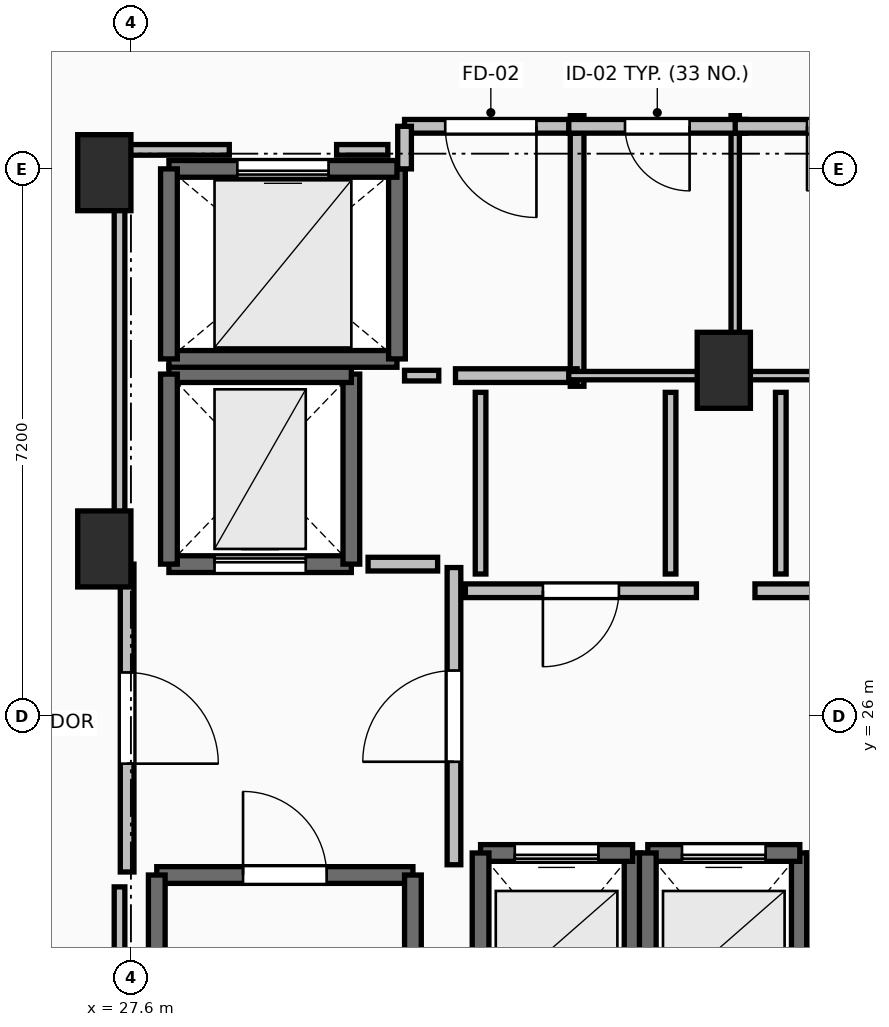
"""IFC4 building model, lengths in metres.
Left out: names, types, materials, properties, quantities, classifications, styles, units other than length and angle.
Written with IfcOpenShell. Run it as: python <this file> out.ifc"""

import sys

from ifc_helpers import new_model, si_unit, direction, frame, frame_2d, origin, origin_2d, place, context, subcontext, project, spatial, rectangle, extrude, element, fill, save


model = new_model("IFC4")
c1 = context("Model", 3, precision=1e-05, world=origin(), true_north=direction((0.0, 1.0)))
c2 = subcontext(c1, "Body", "Model", "MODEL_VIEW")
j1 = project(units=[si_unit("LENGTHUNIT", "METRE"), si_unit("PLANEANGLEUNIT", "RADIAN")], contexts=[c1])
p1 = place(None, origin())
s1 = spatial("IfcSite", under=j1, at=p1, CompositionType="ELEMENT")
p2 = place(p1, origin())
s2 = spatial("IfcBuilding", under=s1, at=p2, CompositionType="ELEMENT")
p3 = place(p2, frame((0.0, 0.0, 217.85)))
s3 = spatial("IfcBuildingStorey", under=s2, at=p3, CompositionType="ELEMENT", Elevation=217.85)
for number, where, z_axis, x_axis in (
    (1, (27.25, 28.2, 0.0), (0.0, 0.0, 1.0), (1.0, 0.0, 0.0)),
    (2, (27.25, 33.15, 0.0), (0.0, 0.0, 1.0), (1.0, 0.0, 0.0)),
    (3, (35.4, 30.55, 0.0), (0.0, 0.0, 1.0), (1.0, 0.0, 0.0)),
):
    element("IfcColumn", number, at=place(p3, frame(where, z_axis=z_axis, x_axis=x_axis)), inside=s3, PredefinedType="PILASTER", context=c2, shape_type="SweptSolid", body=[
        extrude(rectangle(XDim=0.7, YDim=1.0, at=origin_2d()), origin(), (0.0, 0.0, 1.0), 3.55),
    ])
p4 = place(p3, frame((27.94, 23.91, 0.0), z_axis=(0.0, 0.0, 1.0), x_axis=(1.0, 0.0, 0.0)))
e4 = element("IfcWall", 4, at=p4, inside=s3, PredefinedType="SOLIDWALL", context=c2, shape_type="SweptSolid", body=[
    extrude(rectangle(XDim=3.37, YDim=0.22, at=frame_2d((1.685, 0.0))), origin(), (0.0, 0.0, 1.0), 3.29),
])
p5 = place(p4, frame((1.135, 0.0, 0.0)))
e5 = element("IfcOpeningElement", 5, at=p5, cuts=e4, PredefinedType="OPENING", context=c2, shape_type="SweptSolid", body=[
    extrude(rectangle(XDim=1.1, YDim=2.15, at=frame_2d((0.55, 1.075))), frame((0.0, 0.125, 0.0), z_axis=(0.0, -1.0, 0.0), x_axis=(1.0, 0.0, 0.0)), (0.0, 0.0, 1.0), 0.25),
])
for number, where, z_axis, x_axis in (
    (6, (31.31, 23.91, 0.0), (0.0, 0.0, 1.0), (0.0, -1.0, 0.0)),
    (7, (27.94, 16.49, 0.0), (0.0, 0.0, 1.0), (0.0, 1.0, 0.0)),
):
    element("IfcWall", number, at=place(p3, frame(where, z_axis=z_axis, x_axis=x_axis)), inside=s3, PredefinedType="SOLIDWALL", context=c2, shape_type="SweptSolid", body=[
        extrude(rectangle(XDim=7.42, YDim=0.22, at=frame_2d((3.71, 0.0))), origin(), (0.0, 0.0, 1.0), 3.29),
    ])
p6 = place(p3, frame((34.2, 21.8, 0.0), z_axis=(0.0, 0.0, 1.0), x_axis=(0.0, 1.0, 0.0)))
e8 = element("IfcWall", 8, at=p6, inside=s3, PredefinedType="SOLIDWALL", context=c2, shape_type="SweptSolid", body=[
    extrude(rectangle(XDim=2.4, YDim=0.22, at=frame_2d((1.2, 0.0))), origin(), (0.0, 0.0, 1.0), 3.29),
])
p7 = place(p3, frame((34.2, 24.2, 0.0), z_axis=(0.0, 0.0, 1.0), x_axis=(-1.0, 0.0, 0.0)))
e9 = element("IfcWall", 9, at=p7, inside=s3, PredefinedType="SOLIDWALL", context=c2, shape_type="SweptSolid", body=[
    extrude(rectangle(XDim=2.0, YDim=0.22, at=frame_2d((1.0, 0.0))), origin(), (0.0, 0.0, 1.0), 3.29),
])
p8 = place(p7, frame((0.45, 0.0, 0.0)))
e10 = element("IfcOpeningElement", 10, at=p8, cuts=e9, PredefinedType="OPENING", context=c2, shape_type="SweptSolid", body=[
    extrude(rectangle(XDim=1.1, YDim=2.2, at=frame_2d((0.55, 1.1))), frame((0.0, 0.125, 0.0), z_axis=(0.0, -1.0, 0.0), x_axis=(1.0, 0.0, 0.0)), (0.0, 0.0, 1.0), 0.25),
])
for number, where, z_axis, x_axis in (
    (11, (32.2, 24.2, 0.0), (0.0, 0.0, 1.0), (0.0, -1.0, 0.0)),
    (12, (36.4, 21.8, 0.0), (0.0, 0.0, 1.0), (0.0, 1.0, 0.0)),
):
    element("IfcWall", number, at=place(p3, frame(where, z_axis=z_axis, x_axis=x_axis)), inside=s3, PredefinedType="SOLIDWALL", context=c2, shape_type="SweptSolid", body=[
        extrude(rectangle(XDim=2.4, YDim=0.22, at=frame_2d((1.2, 0.0))), origin(), (0.0, 0.0, 1.0), 3.29),
    ])
p9 = place(p3, frame((36.4, 24.2, 0.0), z_axis=(0.0, 0.0, 1.0), x_axis=(-1.0, 0.0, 0.0)))
e13 = element("IfcWall", 13, at=p9, inside=s3, PredefinedType="SOLIDWALL", context=c2, shape_type="SweptSolid", body=[
    extrude(rectangle(XDim=2.0, YDim=0.22, at=frame_2d((1.0, 0.0))), origin(), (0.0, 0.0, 1.0), 3.29),
])
p10 = place(p9, frame((0.45, 0.0, 0.0)))
e14 = element("IfcOpeningElement", 14, at=p10, cuts=e13, PredefinedType="OPENING", context=c2, shape_type="SweptSolid", body=[
    extrude(rectangle(XDim=1.1, YDim=2.2, at=frame_2d((0.55, 1.1))), frame((0.0, 0.125, 0.0), z_axis=(0.0, -1.0, 0.0), x_axis=(1.0, 0.0, 0.0)), (0.0, 0.0, 1.0), 0.25),
])
p11 = place(p3, frame((34.4, 24.2, 0.0), z_axis=(0.0, 0.0, 1.0), x_axis=(0.0, -1.0, 0.0)))
e15 = element("IfcWall", 15, at=p11, inside=s3, PredefinedType="SOLIDWALL", context=c2, shape_type="SweptSolid", body=[
    extrude(rectangle(XDim=2.4, YDim=0.22, at=frame_2d((1.2, 0.0))), origin(), (0.0, 0.0, 1.0), 3.29),
])
p12 = place(p3, frame((36.6, 24.2, 0.0), z_axis=(0.0, 0.0, 1.0), x_axis=(0.0, -1.0, 0.0)))
e16 = element("IfcWall", 16, at=p12, inside=s3, PredefinedType="SOLIDWALL", context=c2, shape_type="SweptSolid", body=[
    extrude(rectangle(XDim=2.6, YDim=0.22, at=frame_2d((1.3, 0.0))), origin(), (0.0, 0.0, 1.0), 3.29),
])
p13 = place(p3, frame((28.1, 28.0, 0.0), z_axis=(0.0, 0.0, 1.0), x_axis=(1.0, 0.0, 0.0)))
e17 = element("IfcWall", 17, at=p13, inside=s3, PredefinedType="SHEAR", context=c2, shape_type="SweptSolid", body=[
    extrude(rectangle(XDim=2.4, YDim=0.22, at=frame_2d((1.2, 0.0))), origin(), (0.0, 0.0, 1.0), 3.29),
])
p14 = place(p13, frame((0.6, 0.0, 0.0)))
e18 = element("IfcOpeningElement", 18, at=p14, cuts=e17, PredefinedType="OPENING", context=c2, shape_type="SweptSolid", body=[
    extrude(rectangle(XDim=1.2, YDim=2.2, at=frame_2d((0.6, 1.1))), frame((0.0, 0.125, 0.0), z_axis=(0.0, -1.0, 0.0), x_axis=(1.0, 0.0, 0.0)), (0.0, 0.0, 1.0), 0.25),
])
p15 = place(p3, frame((30.5, 28.0, 0.0), z_axis=(0.0, 0.0, 1.0), x_axis=(0.0, 1.0, 0.0)))
e19 = element("IfcWall", 19, at=p15, inside=s3, PredefinedType="SHEAR", context=c2, shape_type="SweptSolid", body=[
    extrude(rectangle(XDim=2.5, YDim=0.22, at=frame_2d((1.25, 0.0))), origin(), (0.0, 0.0, 1.0), 3.29),
])
p16 = place(p3, frame((30.5, 30.5, 0.0), z_axis=(0.0, 0.0, 1.0), x_axis=(-1.0, 0.0, 0.0)))
e20 = element("IfcWall", 20, at=p16, inside=s3, PredefinedType="SHEAR", context=c2, shape_type="SweptSolid", body=[
    extrude(rectangle(XDim=2.4, YDim=0.22, at=frame_2d((1.2, 0.0))), origin(), (0.0, 0.0, 1.0), 3.29),
])
p17 = place(p3, frame((28.1, 30.5, 0.0), z_axis=(0.0, 0.0, 1.0), x_axis=(0.0, -1.0, 0.0)))
e21 = element("IfcWall", 21, at=p17, inside=s3, PredefinedType="SHEAR", context=c2, shape_type="SweptSolid", body=[
    extrude(rectangle(XDim=2.5, YDim=0.22, at=frame_2d((1.25, 0.0))), origin(), (0.0, 0.0, 1.0), 3.29),
])
p18 = place(p3, frame((28.1, 30.7, 0.0), z_axis=(0.0, 0.0, 1.0), x_axis=(1.0, 0.0, 0.0)))
e22 = element("IfcWall", 22, at=p18, inside=s3, PredefinedType="SOLIDWALL", context=c2, shape_type="SweptSolid", body=[
    extrude(rectangle(XDim=3.0, YDim=0.22, at=frame_2d((1.5, 0.0))), origin(), (0.0, 0.0, 1.0), 3.29),
])
p19 = place(p3, frame((31.1, 30.7, 0.0), z_axis=(0.0, 0.0, 1.0), x_axis=(0.0, 1.0, 0.0)))
e23 = element("IfcWall", 23, at=p19, inside=s3, PredefinedType="SOLIDWALL", context=c2, shape_type="SweptSolid", body=[
    extrude(rectangle(XDim=2.5, YDim=0.22, at=frame_2d((1.25, 0.0))), origin(), (0.0, 0.0, 1.0), 3.29),
])
p20 = place(p3, frame((31.1, 33.2, 0.0), z_axis=(0.0, 0.0, 1.0), x_axis=(-1.0, 0.0, 0.0)))
e24 = element("IfcWall", 24, at=p20, inside=s3, PredefinedType="SOLIDWALL", context=c2, shape_type="SweptSolid", body=[
    extrude(rectangle(XDim=3.0, YDim=0.22, at=frame_2d((1.5, 0.0))), origin(), (0.0, 0.0, 1.0), 3.29),
])
p21 = place(p20, frame((0.9, 0.0, 0.0)))
e25 = element("IfcOpeningElement", 25, at=p21, cuts=e24, PredefinedType="OPENING", context=c2, shape_type="SweptSolid", body=[
    extrude(rectangle(XDim=1.2, YDim=2.2, at=frame_2d((0.6, 1.1))), frame((0.0, 0.125, 0.0), z_axis=(0.0, -1.0, 0.0), x_axis=(1.0, 0.0, 0.0)), (0.0, 0.0, 1.0), 0.25),
])
p22 = place(p3, frame((28.1, 33.2, 0.0), z_axis=(0.0, 0.0, 1.0), x_axis=(0.0, -1.0, 0.0)))
e26 = element("IfcWall", 26, at=p22, inside=s3, PredefinedType="SOLIDWALL", context=c2, shape_type="SweptSolid", body=[
    extrude(rectangle(XDim=2.5, YDim=0.22, at=frame_2d((1.25, 0.0))), origin(), (0.0, 0.0, 1.0), 3.29),
])
p23 = place(p3, frame((31.85, 24.045, 0.0), z_axis=(0.0, 0.0, 1.0), x_axis=(0.0, 1.0, 0.0)))
e27 = element("IfcWall", 27, at=p23, inside=s3, PredefinedType="PARTITIONING", context=c2, shape_type="SweptSolid", body=[
    extrude(rectangle(XDim=3.91, YDim=0.18, at=frame_2d((1.955, 0.0))), origin(), (0.0, 0.0, 1.0), 3.29),
])
p24 = place(p23, frame((1.355, 0.0, 0.0)))
e28 = element("IfcOpeningElement", 28, at=p24, cuts=e27, PredefinedType="OPENING", context=c2, shape_type="SweptSolid", body=[
    extrude(rectangle(XDim=1.2, YDim=2.15, at=frame_2d((0.6, 1.075))), frame((0.0, 0.105, 0.0), z_axis=(0.0, -1.0, 0.0), x_axis=(1.0, 0.0, 0.0)), (0.0, 0.0, 1.0), 0.21),
])
p25 = place(p3, frame((27.55, 28.0, 0.0), z_axis=(0.0, 0.0, 1.0), x_axis=(0.0, -1.0, 0.0)))
e29 = element("IfcWall", 29, at=p25, inside=s3, PredefinedType="PARTITIONING", context=c2, shape_type="SweptSolid", body=[
    extrude(rectangle(XDim=4.05, YDim=0.18, at=frame_2d((2.025, 0.0))), origin(), (0.0, 0.0, 1.0), 3.29),
])
p26 = place(p25, frame((1.425, 0.0, 0.0)))
e30 = element("IfcOpeningElement", 30, at=p26, cuts=e29, PredefinedType="OPENING", context=c2, shape_type="SweptSolid", body=[
    extrude(rectangle(XDim=1.2, YDim=2.15, at=frame_2d((0.6, 1.075))), frame((0.0, 0.105, 0.0), z_axis=(0.0, -1.0, 0.0), x_axis=(1.0, 0.0, 0.0)), (0.0, 0.0, 1.0), 0.21),
])
p27 = place(p3, frame((33.47, 30.34, 0.0), z_axis=(0.0, 0.0, 1.0), x_axis=(0.0, 1.0, 0.0)))
e31 = element("IfcWall", 31, at=p27, inside=s3, PredefinedType="PARTITIONING", context=c2, shape_type="SweptSolid", body=[
    extrude(rectangle(XDim=3.56, YDim=0.18, at=frame_2d((1.78, 0.0))), origin(), (0.0, 0.0, 1.0), 3.29),
])
p28 = place(p3, frame((31.87, 30.48, 0.0), z_axis=(0.0, 0.0, 1.0), x_axis=(1.0, 0.0, 0.0)))
e32 = element("IfcWall", 32, at=p28, inside=s3, PredefinedType="PARTITIONING", context=c2, shape_type="SweptSolid", body=[
    extrude(rectangle(XDim=1.6, YDim=0.18, at=frame_2d((0.8, 0.0))), origin(), (0.0, 0.0, 1.0), 3.29),
])
p29 = place(p3, frame((33.47, 33.76, 0.0), z_axis=(0.0, 0.0, 1.0), x_axis=(-1.0, 0.0, 0.0)))
e33 = element("IfcWall", 33, at=p29, inside=s3, PredefinedType="PARTITIONING", context=c2, shape_type="SweptSolid", body=[
    extrude(rectangle(XDim=2.27, YDim=0.18, at=frame_2d((1.135, 0.0))), origin(), (0.0, 0.0, 1.0), 3.29),
])
p30 = place(p29, frame((0.535, 0.0, 0.0)))
e34 = element("IfcOpeningElement", 34, at=p30, cuts=e33, PredefinedType="OPENING", context=c2, shape_type="SweptSolid", body=[
    extrude(rectangle(XDim=1.2, YDim=2.15, at=frame_2d((0.6, 1.075))), frame((0.0, 0.105, 0.0), z_axis=(0.0, -1.0, 0.0), x_axis=(1.0, 0.0, 0.0)), (0.0, 0.0, 1.0), 0.21),
])
p31 = place(p3, frame((31.2, 33.76, 0.0), z_axis=(0.0, 0.0, 1.0), x_axis=(0.0, -1.0, 0.0)))
e35 = element("IfcWall", 35, at=p31, inside=s3, PredefinedType="PARTITIONING", context=c2, shape_type="SweptSolid", body=[
    extrude(rectangle(XDim=0.56, YDim=0.18, at=frame_2d((0.28, 0.0))), origin(), (0.0, 0.0, 1.0), 3.29),
])
p32 = place(p3, frame((35.04, 27.65, 0.0), z_axis=(0.0, 0.0, 1.0), x_axis=(-1.0, 0.0, 0.0)))
e36 = element("IfcWall", 36, at=p32, inside=s3, PredefinedType="PARTITIONING", context=c2, shape_type="SweptSolid", body=[
    extrude(rectangle(XDim=3.04, YDim=0.18, at=frame_2d((1.52, 0.0))), origin(), (0.0, 0.0, 1.0), 3.29),
])
p33 = place(p32, frame((1.02, 0.0, 0.0)))
e37 = element("IfcOpeningElement", 37, at=p33, cuts=e36, PredefinedType="OPENING", context=c2, shape_type="SweptSolid", body=[
    extrude(rectangle(XDim=1.0, YDim=2.15, at=frame_2d((0.5, 1.075))), frame((0.0, 0.105, 0.0), z_axis=(0.0, -1.0, 0.0), x_axis=(1.0, 0.0, 0.0)), (0.0, 0.0, 1.0), 0.21),
])
p34 = place(p3, frame((39.19, 27.65, 0.0), z_axis=(0.0, 0.0, 1.0), x_axis=(-1.0, 0.0, 0.0)))
e38 = element("IfcWall", 38, at=p34, inside=s3, PredefinedType="PARTITIONING", context=c2, shape_type="SweptSolid", body=[
    extrude(rectangle(XDim=3.38, YDim=0.18, at=frame_2d((1.69, 0.0))), origin(), (0.0, 0.0, 1.0), 3.29),
])
p35 = place(p34, frame((1.265, 0.0, 0.0)))
e39 = element("IfcOpeningElement", 39, at=p35, cuts=e38, PredefinedType="OPENING", context=c2, shape_type="SweptSolid", body=[
    extrude(rectangle(XDim=0.85, YDim=2.1, at=frame_2d((0.425, 1.05))), frame((0.0, 0.105, 0.0), z_axis=(0.0, -1.0, 0.0), x_axis=(1.0, 0.0, 0.0)), (0.0, 0.0, 1.0), 0.21),
])
p36 = place(p3, frame((35.55, 30.34, 0.0), z_axis=(0.0, 0.0, 1.0), x_axis=(0.0, 1.0, 0.0)))
e40 = element("IfcWall", 40, at=p36, inside=s3, PredefinedType="PARTITIONING", context=c2, shape_type="SweptSolid", body=[
    extrude(rectangle(XDim=3.56, YDim=0.11, at=frame_2d((1.78, 0.0))), origin(), (0.0, 0.0, 1.0), 2.482),
])
p37 = place(p3, frame((33.36, 30.48, 0.0), z_axis=(0.0, 0.0, 1.0), x_axis=(1.0, 0.0, 0.0)))
e41 = element("IfcWall", 41, at=p37, inside=s3, PredefinedType="PARTITIONING", context=c2, shape_type="SweptSolid", body=[
    extrude(rectangle(XDim=1.81, YDim=0.11, at=frame_2d((0.905, 0.0))), origin(), (0.0, 0.0, 1.0), 3.29),
])
p38 = place(p3, frame((35.69, 33.76, 0.0), z_axis=(0.0, 0.0, 1.0), x_axis=(-1.0, 0.0, 0.0)))
e42 = element("IfcWall", 42, at=p38, inside=s3, PredefinedType="PARTITIONING", context=c2, shape_type="SweptSolid", body=[
    extrude(rectangle(XDim=2.33, YDim=0.18, at=frame_2d((1.165, 0.0))), origin(), (0.0, 0.0, 1.0), 3.29),
])
p39 = place(p38, frame((0.74, 0.0, 0.0)))
e43 = element("IfcOpeningElement", 43, at=p39, cuts=e42, PredefinedType="OPENING", context=c2, shape_type="SweptSolid", body=[
    extrude(rectangle(XDim=0.85, YDim=2.1, at=frame_2d((0.425, 1.05))), frame((0.0, 0.105, 0.0), z_axis=(0.0, -1.0, 0.0), x_axis=(1.0, 0.0, 0.0)), (0.0, 0.0, 1.0), 0.21),
])
p40 = place(p3, frame((35.68, 30.48, 0.0), z_axis=(0.0, 0.0, 1.0), x_axis=(1.0, 0.0, 0.0)))
e44 = element("IfcWall", 44, at=p40, inside=s3, PredefinedType="PARTITIONING", context=c2, shape_type="SweptSolid", body=[
    extrude(rectangle(XDim=2.595, YDim=0.11, at=frame_2d((1.297, 0.0))), origin(), (0.0, 0.0, 1.0), 2.482),
])
p41 = place(p3, frame((38.29, 33.76, 0.0), z_axis=(0.0, 0.0, 1.0), x_axis=(-1.0, 0.0, 0.0)))
e45 = element("IfcWall", 45, at=p41, inside=s3, PredefinedType="PARTITIONING", context=c2, shape_type="SweptSolid", body=[
    extrude(rectangle(XDim=2.74, YDim=0.18, at=frame_2d((1.37, 0.0))), origin(), (0.0, 0.0, 1.0), 3.29),
])
p42 = place(p41, frame((0.945, 0.0, 0.0)))
e46 = element("IfcOpeningElement", 46, at=p42, cuts=e45, PredefinedType="OPENING", context=c2, shape_type="SweptSolid", body=[
    extrude(rectangle(XDim=0.85, YDim=2.1, at=frame_2d((0.425, 1.05))), frame((0.0, 0.105, 0.0), z_axis=(0.0, -1.0, 0.0), x_axis=(1.0, 0.0, 0.0)), (0.0, 0.0, 1.0), 0.21),
])
p43 = place(p3, frame((31.635, 28.0, 0.0), z_axis=(0.0, 0.0, 1.0), x_axis=(-1.0, 0.0, 0.0)))
e47 = element("IfcWall", 47, at=p43, inside=s3, PredefinedType="PARTITIONING", context=c2, shape_type="SweptSolid", body=[
    extrude(rectangle(XDim=0.915, YDim=0.18, at=frame_2d((0.458, 0.0))), origin(), (0.0, 0.0, 1.0), 3.29),
])
p44 = place(p3, frame((31.2, 30.48, 0.0), z_axis=(0.0, 0.0, 1.0), x_axis=(1.0, 0.0, 0.0)))
e48 = element("IfcWall", 48, at=p44, inside=s3, PredefinedType="PARTITIONING", context=c2, shape_type="SweptSolid", body=[
    extrude(rectangle(XDim=0.45, YDim=0.14, at=frame_2d((0.225, 0.0))), origin(), (0.0, 0.0, 1.0), 3.29),
])
for number, where, z_axis, x_axis in (
    (49, (32.2, 30.26, 0.0), (0.0, 0.0, 1.0), (0.0, -1.0, 0.0)),
    (50, (34.7, 27.87, 0.0), (0.0, 0.0, 1.0), (0.0, 1.0, 0.0)),
    (51, (36.15, 30.26, 0.0), (0.0, 0.0, 1.0), (0.0, -1.0, 0.0)),
):
    element("IfcWall", number, at=place(p3, frame(where, z_axis=z_axis, x_axis=x_axis)), inside=s3, PredefinedType="PARTITIONING", context=c2, shape_type="SweptSolid", body=[
        extrude(rectangle(XDim=2.39, YDim=0.14, at=frame_2d((1.195, 0.0))), origin(), (0.0, 0.0, 1.0), 3.29),
    ])
p45 = place(p3, frame((30.98, 33.45, 0.0), z_axis=(0.0, 0.0, 1.0), x_axis=(-1.0, 0.0, 0.0)))
e52 = element("IfcWall", 52, at=p45, inside=s3, PredefinedType="PARTITIONING", context=c2, shape_type="SweptSolid", body=[
    extrude(rectangle(XDim=0.674, YDim=0.14, at=frame_2d((0.337, 0.0))), origin(), (0.0, 0.0, 1.0), 3.29),
])
p46 = place(p3, frame((28.894, 33.45, 0.0), z_axis=(0.0, 0.0, 1.0), x_axis=(-1.0, 0.0, 0.0)))
e53 = element("IfcWall", 53, at=p46, inside=s3, PredefinedType="PARTITIONING", context=c2, shape_type="SweptSolid", body=[
    extrude(rectangle(XDim=1.444, YDim=0.14, at=frame_2d((0.722, 0.0))), origin(), (0.0, 0.0, 1.0), 2.482),
])
p47 = place(p3, frame((27.45, 33.45, 0.0), z_axis=(0.0, 0.0, 1.0), x_axis=(0.0, -1.0, 0.0)))
e54 = element("IfcWall", 54, at=p47, inside=s3, PredefinedType="PARTITIONING", context=c2, shape_type="SweptSolid", body=[
    extrude(rectangle(XDim=5.254, YDim=0.14, at=frame_2d((2.627, 0.0))), origin(), (0.0, 0.0, 1.0), 2.482),
])
p48 = place(p3, frame((27.45, 23.754, 0.0), z_axis=(0.0, 0.0, 1.0), x_axis=(0.0, -1.0, 0.0)))
e55 = element("IfcWall", 55, at=p48, inside=s3, PredefinedType="PARTITIONING", context=c2, shape_type="SweptSolid", body=[
    extrude(rectangle(XDim=7.514, YDim=0.14, at=frame_2d((3.757, 0.0))), origin(), (0.0, 0.0, 1.0), 2.482),
])
p49 = place(p5, origin())
e56 = element("IfcDoor", 56, at=p49, inside=s3, OperationType="SINGLE_SWING_LEFT", PredefinedType="DOOR", context=c2, shape_type="SweptSolid", body=[
    extrude(rectangle(XDim=1.1, YDim=2.15, at=frame_2d((0.55, 1.075))), frame((0.0, 0.025, 0.0), z_axis=(0.0, -1.0, 0.0), x_axis=(1.0, 0.0, 0.0)), (0.0, 0.0, 1.0), 0.05),
])
fill(e5, e56)
p50 = place(p8, origin())
e57 = element("IfcDoor", 57, at=p50, inside=s3, OperationType="SLIDING_TO_LEFT", PredefinedType="DOOR", context=c2, shape_type="SweptSolid", body=[
    extrude(rectangle(XDim=1.1, YDim=2.2, at=frame_2d((0.55, 1.1))), frame((0.0, 0.025, 0.0), z_axis=(0.0, -1.0, 0.0), x_axis=(1.0, 0.0, 0.0)), (0.0, 0.0, 1.0), 0.05),
])
fill(e10, e57)
p51 = place(p10, origin())
e58 = element("IfcDoor", 58, at=p51, inside=s3, OperationType="SLIDING_TO_LEFT", PredefinedType="DOOR", context=c2, shape_type="SweptSolid", body=[
    extrude(rectangle(XDim=1.1, YDim=2.2, at=frame_2d((0.55, 1.1))), frame((0.0, 0.025, 0.0), z_axis=(0.0, -1.0, 0.0), x_axis=(1.0, 0.0, 0.0)), (0.0, 0.0, 1.0), 0.05),
])
fill(e14, e58)
p52 = place(p14, origin())
e59 = element("IfcDoor", 59, at=p52, inside=s3, OperationType="SLIDING_TO_LEFT", PredefinedType="DOOR", context=c2, shape_type="SweptSolid", body=[
    extrude(rectangle(XDim=1.2, YDim=2.2, at=frame_2d((0.6, 1.1))), frame((0.0, 0.025, 0.0), z_axis=(0.0, -1.0, 0.0), x_axis=(1.0, 0.0, 0.0)), (0.0, 0.0, 1.0), 0.05),
])
fill(e18, e59)
p53 = place(p21, origin())
e60 = element("IfcDoor", 60, at=p53, inside=s3, OperationType="SLIDING_TO_LEFT", PredefinedType="DOOR", context=c2, shape_type="SweptSolid", body=[
    extrude(rectangle(XDim=1.2, YDim=2.2, at=frame_2d((0.6, 1.1))), frame((0.0, 0.025, 0.0), z_axis=(0.0, -1.0, 0.0), x_axis=(1.0, 0.0, 0.0)), (0.0, 0.0, 1.0), 0.05),
])
fill(e25, e60)
p54 = place(p24, origin())
e61 = element("IfcDoor", 61, at=p54, inside=s3, OperationType="SINGLE_SWING_LEFT", PredefinedType="DOOR", context=c2, shape_type="SweptSolid", body=[
    extrude(rectangle(XDim=1.2, YDim=2.15, at=frame_2d((0.6, 1.075))), frame((0.0, 0.025, 0.0), z_axis=(0.0, -1.0, 0.0), x_axis=(1.0, 0.0, 0.0)), (0.0, 0.0, 1.0), 0.05),
])
fill(e28, e61)
p55 = place(p26, origin())
e62 = element("IfcDoor", 62, at=p55, inside=s3, OperationType="SINGLE_SWING_RIGHT", PredefinedType="DOOR", context=c2, shape_type="SweptSolid", body=[
    extrude(rectangle(XDim=1.2, YDim=2.15, at=frame_2d((0.6, 1.075))), frame((0.0, 0.025, 0.0), z_axis=(0.0, -1.0, 0.0), x_axis=(1.0, 0.0, 0.0)), (0.0, 0.0, 1.0), 0.05),
])
fill(e30, e62)
p56 = place(p30, origin())
e63 = element("IfcDoor", 63, at=p56, inside=s3, OperationType="SINGLE_SWING_LEFT", PredefinedType="DOOR", context=c2, shape_type="SweptSolid", body=[
    extrude(rectangle(XDim=1.2, YDim=2.15, at=frame_2d((0.6, 1.075))), frame((0.0, 0.025, 0.0), z_axis=(0.0, -1.0, 0.0), x_axis=(1.0, 0.0, 0.0)), (0.0, 0.0, 1.0), 0.05),
])
fill(e34, e63)
p57 = place(p33, origin())
e64 = element("IfcDoor", 64, at=p57, inside=s3, OperationType="SINGLE_SWING_RIGHT", PredefinedType="DOOR", context=c2, shape_type="SweptSolid", body=[
    extrude(rectangle(XDim=1.0, YDim=2.15, at=frame_2d((0.5, 1.075))), frame((0.0, 0.025, 0.0), z_axis=(0.0, -1.0, 0.0), x_axis=(1.0, 0.0, 0.0)), (0.0, 0.0, 1.0), 0.05),
])
fill(e37, e64)
p58 = place(p39, origin())
e65 = element("IfcDoor", 65, at=p58, inside=s3, OperationType="SINGLE_SWING_LEFT", PredefinedType="DOOR", context=c2, shape_type="SweptSolid", body=[
    extrude(rectangle(XDim=0.85, YDim=2.1, at=frame_2d((0.425, 1.05))), frame((0.0, 0.025, 0.0), z_axis=(0.0, -1.0, 0.0), x_axis=(1.0, 0.0, 0.0)), (0.0, 0.0, 1.0), 0.05),
])
fill(e43, e65)
p59 = place(p42, origin())
e66 = element("IfcDoor", 66, at=p59, inside=s3, OperationType="SINGLE_SWING_RIGHT", PredefinedType="DOOR", context=c2, shape_type="SweptSolid", body=[
    extrude(rectangle(XDim=0.85, YDim=2.1, at=frame_2d((0.425, 1.05))), frame((0.0, 0.025, 0.0), z_axis=(0.0, -1.0, 0.0), x_axis=(1.0, 0.0, 0.0)), (0.0, 0.0, 1.0), 0.05),
])
fill(e46, e66)
save(model, sys.argv[1])
